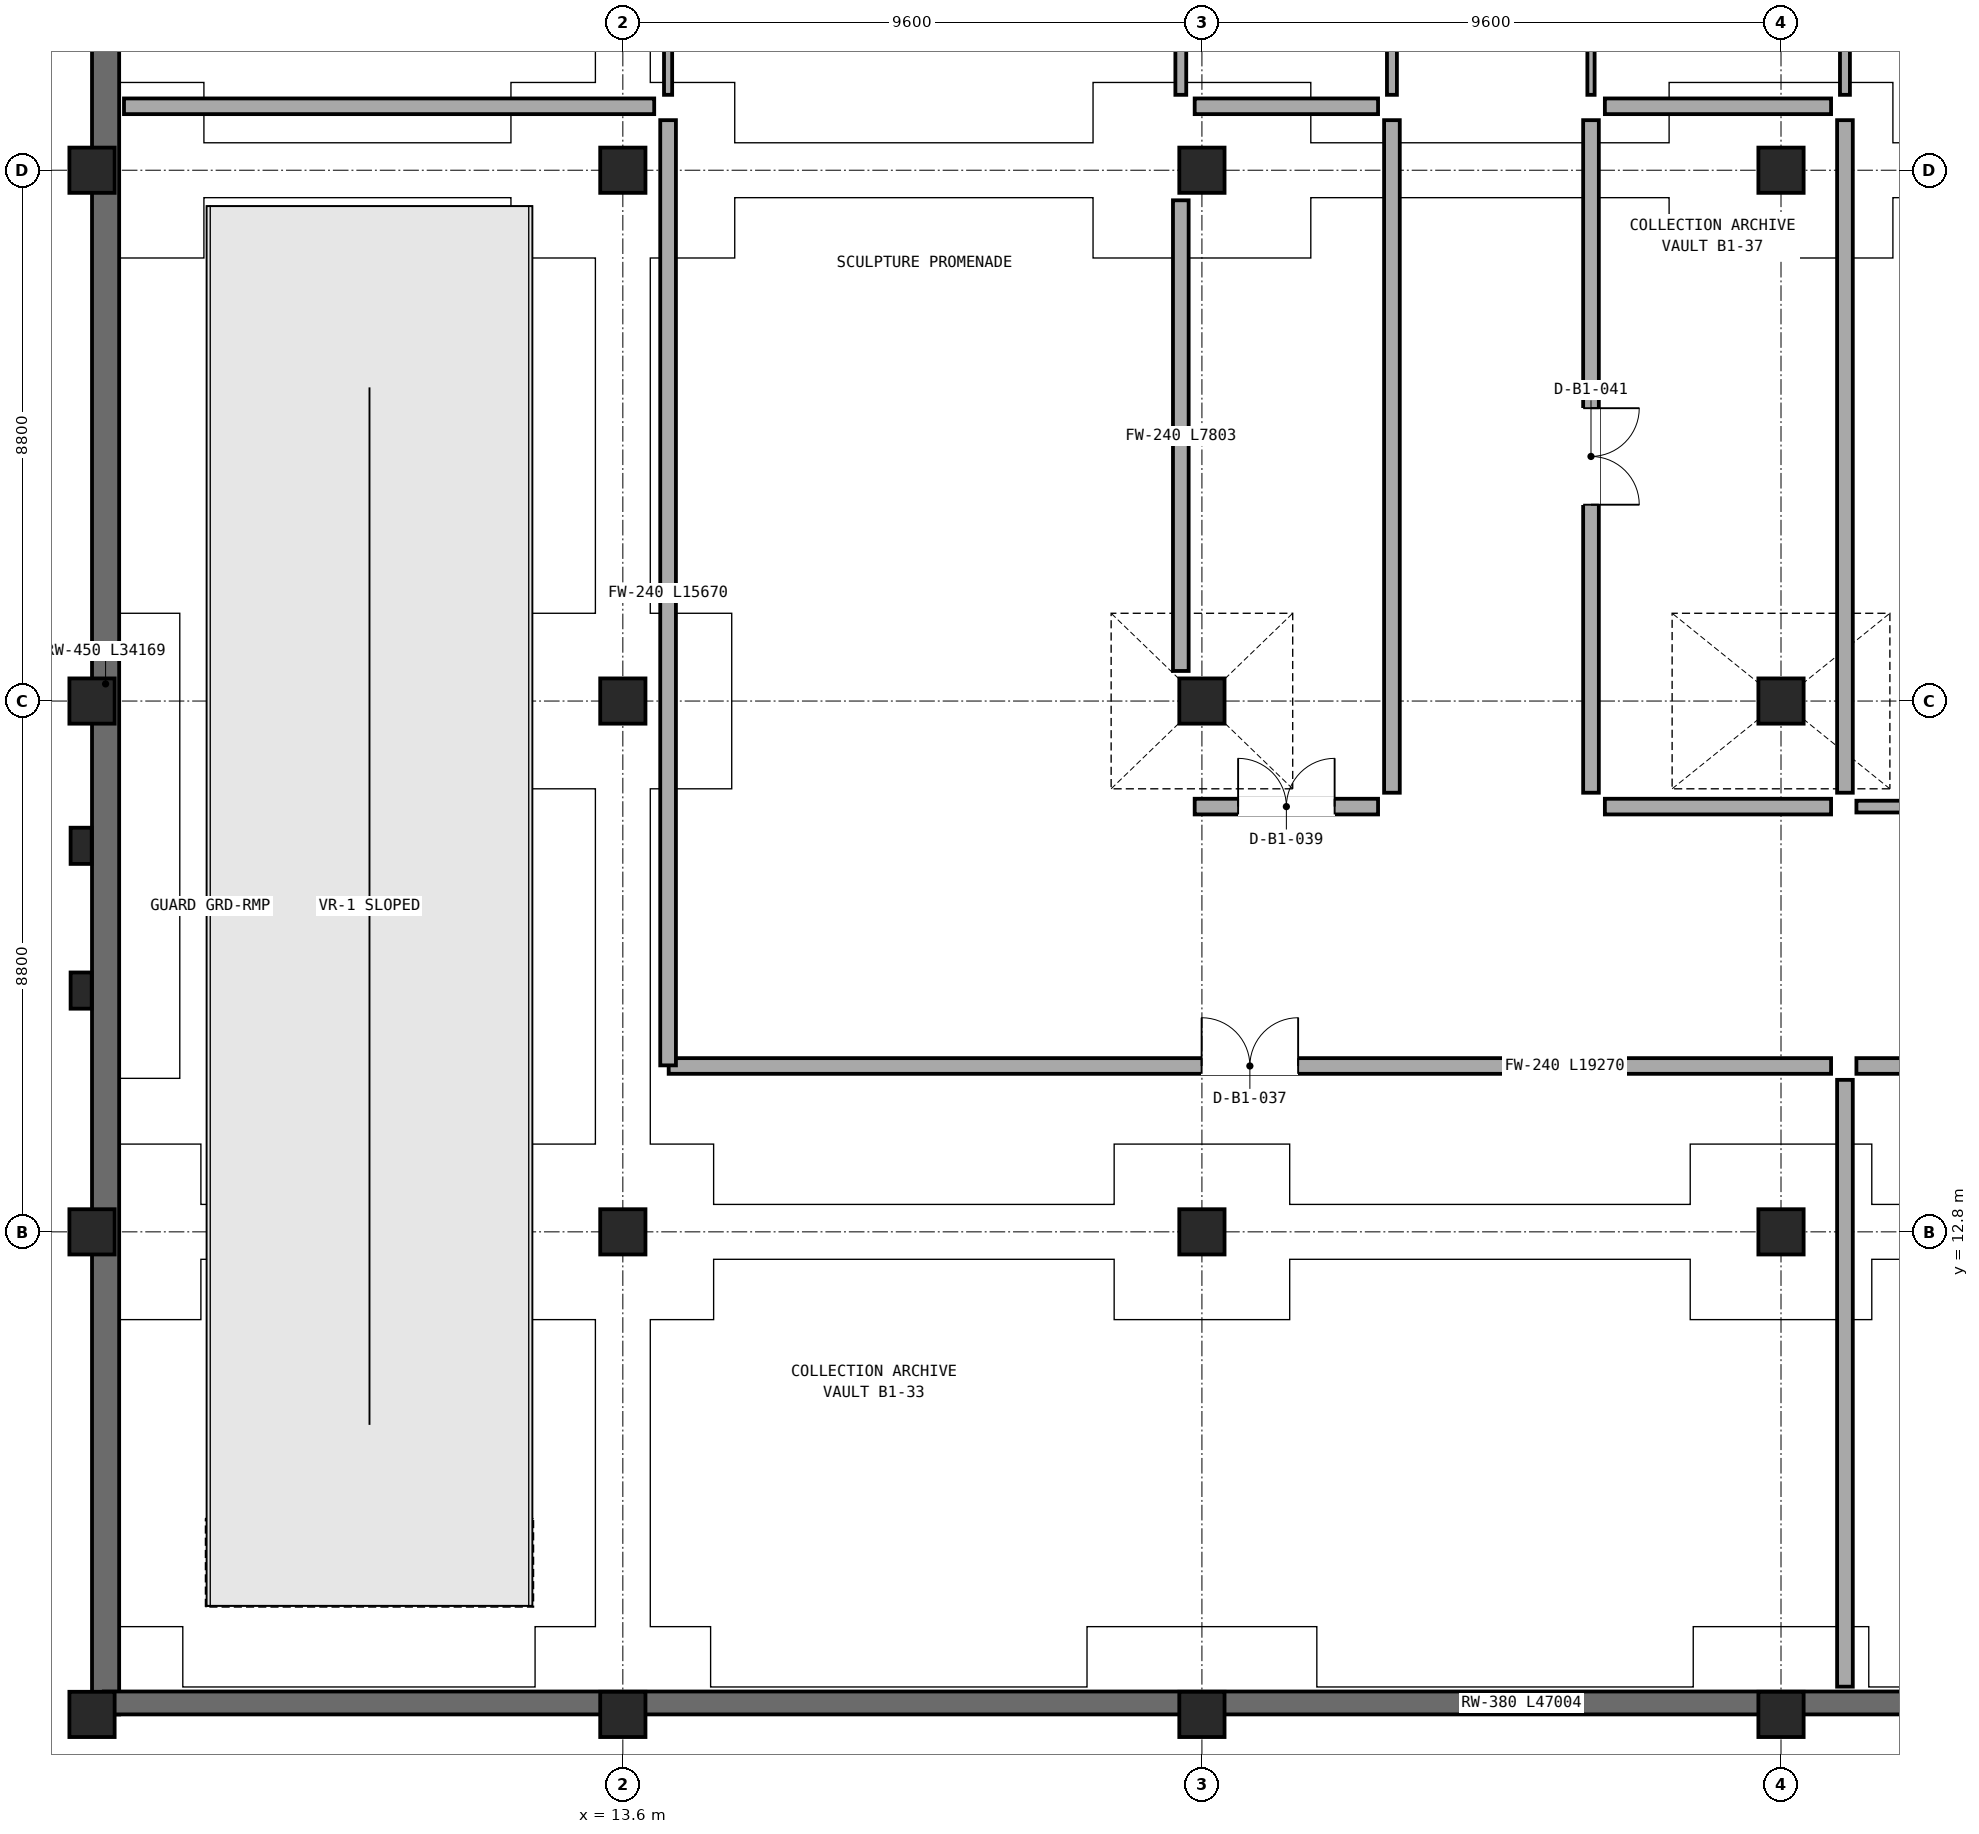
"""IFC4 building model, lengths in metres.
Left out: names, types, materials, properties, quantities, classifications, styles, units other than length and angle.
Written with IfcOpenShell. Run it as: python <this file> out.ifc"""

import sys

from ifc_helpers import new_model, si_unit, direction, frame, frame_2d, origin, origin_2d, place, context, subcontext, project, spatial, rectangle, extrude, element, fill, save


model = new_model("IFC4")
c1 = context("Model", 3, precision=1e-05, world=origin(), true_north=direction((0.0, 1.0)))
c2 = subcontext(c1, "Body", "Model", "MODEL_VIEW")
j1 = project(units=[si_unit("LENGTHUNIT", "METRE"), si_unit("PLANEANGLEUNIT", "RADIAN")], contexts=[c1])
p1 = place(None, origin())
s1 = spatial("IfcSite", under=j1, at=p1, CompositionType="ELEMENT")
p2 = place(p1, origin())
s2 = spatial("IfcBuilding", under=s1, at=p2, CompositionType="ELEMENT")
p3 = place(p2, frame((0.0, 0.0, -5.4)))
s3 = spatial("IfcBuildingStorey", under=s2, at=p3, CompositionType="ELEMENT", Elevation=-5.4)
for number, where, z_axis, x_axis in (
    (1, (4.8, 4.8, 0.0), (0.0, 0.0, 1.0), (1.0, 0.0, 0.0)),
    (2, (4.8, 12.8, 0.0), (0.0, 0.0, 1.0), (1.0, 0.0, 0.0)),
    (3, (4.8, 21.6, 0.0), (0.0, 0.0, 1.0), (1.0, 0.0, 0.0)),
    (4, (4.8, 30.4, 0.0), (0.0, 0.0, 1.0), (1.0, 0.0, 0.0)),
    (5, (13.6, 4.8, 0.0), (0.0, 0.0, 1.0), (1.0, 0.0, 0.0)),
    (6, (13.6, 12.8, 0.0), (0.0, 0.0, 1.0), (1.0, 0.0, 0.0)),
    (7, (13.6, 21.6, 0.0), (0.0, 0.0, 1.0), (1.0, 0.0, 0.0)),
    (8, (13.6, 30.4, 0.0), (0.0, 0.0, 1.0), (1.0, 0.0, 0.0)),
    (9, (23.2, 4.8, 0.0), (0.0, 0.0, 1.0), (1.0, 0.0, 0.0)),
    (10, (23.2, 12.8, 0.0), (0.0, 0.0, 1.0), (1.0, 0.0, 0.0)),
    (11, (23.2, 21.6, 0.0), (0.0, 0.0, 1.0), (1.0, 0.0, 0.0)),
    (12, (23.2, 30.4, 0.0), (0.0, 0.0, 1.0), (1.0, 0.0, 0.0)),
    (13, (32.8, 4.8, 0.0), (0.0, 0.0, 1.0), (1.0, 0.0, 0.0)),
    (14, (32.8, 12.8, 0.0), (0.0, 0.0, 1.0), (1.0, 0.0, 0.0)),
    (15, (32.8, 21.6, 0.0), (0.0, 0.0, 1.0), (1.0, 0.0, 0.0)),
    (16, (32.8, 30.4, 0.0), (0.0, 0.0, 1.0), (1.0, 0.0, 0.0)),
):
    element("IfcColumn", number, at=place(p3, frame(where, z_axis=z_axis, x_axis=x_axis)), inside=s3, PredefinedType="COLUMN", context=c2, shape_type="SweptSolid", body=[
        extrude(rectangle(XDim=0.75, YDim=0.75, at=origin_2d()), origin(), (0.0, 0.0, 1.0), 5.4),
    ])
for number, where, z_axis, x_axis in (
    (17, (4.62, 16.8, 0.0), (0.0, 0.0, 1.0), (0.0, 1.0, 0.0)),
    (18, (4.62, 19.2, 0.0), (0.0, 0.0, 1.0), (0.0, 1.0, 0.0)),
):
    element("IfcColumn", number, at=place(p3, frame(where, z_axis=z_axis, x_axis=x_axis)), inside=s3, PredefinedType="PILASTER", context=c2, shape_type="SweptSolid", body=[
        extrude(rectangle(XDim=0.6, YDim=0.35, at=origin_2d()), origin(), (0.0, 0.0, 1.0), 5.4),
    ])
p4 = place(p3, frame((5.025, 38.969, 0.0), z_axis=(0.0, 0.0, 1.0), x_axis=(0.0, -1.0, 0.0)))
e19 = element("IfcWall", 19, at=p4, inside=s3, PredefinedType="USERDEFINED", context=c2, shape_type="SweptSolid", body=[
    extrude(rectangle(XDim=34.169, YDim=0.45, at=frame_2d((17.084, 0.0))), origin(), (0.0, 0.0, 1.0), 5.06),
])
p5 = place(p3, frame((4.996, 4.99, 0.0), z_axis=(0.0, 0.0, 1.0), x_axis=(1.0, 0.0, 0.0)))
e20 = element("IfcWall", 20, at=p5, inside=s3, PredefinedType="USERDEFINED", context=c2, shape_type="SweptSolid", body=[
    extrude(rectangle(XDim=47.004, YDim=0.38, at=frame_2d((23.502, 0.0))), origin(), (0.0, 0.0, 1.0), 5.06),
])
p6 = place(p3, frame((14.36, 15.55, 0.0), z_axis=(0.0, 0.0, 1.0), x_axis=(1.0, 0.0, 0.0)))
e21 = element("IfcWall", 21, at=p6, inside=s3, PredefinedType="SOLIDWALL", context=c2, shape_type="SweptSolid", body=[
    extrude(rectangle(XDim=19.27, YDim=0.26, at=frame_2d((9.635, 0.0))), origin(), (0.0, 0.0, 1.0), 4.507),
])
p7 = place(p6, frame((8.835, 0.0, 0.0)))
e22 = element("IfcOpeningElement", 22, at=p7, cuts=e21, PredefinedType="OPENING", context=c2, shape_type="SweptSolid", body=[
    extrude(rectangle(XDim=1.6, YDim=2.4, at=frame_2d((0.8, 1.2))), frame((0.0, 0.14, 0.0), z_axis=(0.0, -1.0, 0.0), x_axis=(1.0, 0.0, 0.0)), (0.0, 0.0, 1.0), 0.28),
])
p8 = place(p3, frame((14.35, 31.23, 0.0), z_axis=(0.0, 0.0, 1.0), x_axis=(0.0, -1.0, 0.0)))
e23 = element("IfcWall", 23, at=p8, inside=s3, PredefinedType="SOLIDWALL", context=c2, shape_type="SweptSolid", body=[
    extrude(rectangle(XDim=15.67, YDim=0.26, at=frame_2d((7.835, 0.0))), origin(), (0.0, 0.0, 1.0), 4.428),
])
p9 = place(p3, frame((14.35, 38.84, 0.0), z_axis=(0.0, 0.0, 1.0), x_axis=(0.0, -1.0, 0.0)))
e24 = element("IfcWall", 24, at=p9, inside=s3, PredefinedType="PARTITIONING", context=c2, shape_type="SweptSolid", body=[
    extrude(rectangle(XDim=7.19, YDim=0.135, at=frame_2d((3.595, 0.0))), origin(), (0.0, 0.0, 1.0), 5.03),
])
p10 = place(p9, frame((2.395, 0.0, 0.0)))
e25 = element("IfcOpeningElement", 25, at=p10, cuts=e24, PredefinedType="OPENING", context=c2, shape_type="SweptSolid", body=[
    extrude(rectangle(XDim=2.4, YDim=2.58, at=frame_2d((1.2, 1.29))), frame((0.0, 0.078, 0.0), z_axis=(0.0, -1.0, 0.0), x_axis=(1.0, 0.0, 0.0)), (0.0, 0.0, 1.0), 0.155),
])
p11 = place(p3, frame((26.12, 19.85, 0.0), z_axis=(0.0, 0.0, 1.0), x_axis=(-1.0, 0.0, 0.0)))
e26 = element("IfcWall", 26, at=p11, inside=s3, PredefinedType="SOLIDWALL", context=c2, shape_type="SweptSolid", body=[
    extrude(rectangle(XDim=3.04, YDim=0.26, at=frame_2d((1.52, 0.0))), origin(), (0.0, 0.0, 1.0), 4.507),
])
p12 = place(p11, frame((0.72, 0.0, 0.0)))
e27 = element("IfcOpeningElement", 27, at=p12, cuts=e26, PredefinedType="OPENING", context=c2, shape_type="SweptSolid", body=[
    extrude(rectangle(XDim=1.6, YDim=2.4, at=frame_2d((0.8, 1.2))), frame((0.0, 0.14, 0.0), z_axis=(0.0, -1.0, 0.0), x_axis=(1.0, 0.0, 0.0)), (0.0, 0.0, 1.0), 0.28),
])
p13 = place(p3, frame((22.85, 22.098, 0.0), z_axis=(0.0, 0.0, 1.0), x_axis=(0.0, 1.0, 0.0)))
e28 = element("IfcWall", 28, at=p13, inside=s3, PredefinedType="SOLIDWALL", context=c2, shape_type="SweptSolid", body=[
    extrude(rectangle(XDim=7.803, YDim=0.26, at=frame_2d((3.902, 0.0))), origin(), (0.0, 0.0, 1.0), 5.03),
])
p14 = place(p3, frame((26.35, 31.23, 0.0), z_axis=(0.0, 0.0, 1.0), x_axis=(0.0, -1.0, 0.0)))
e29 = element("IfcWall", 29, at=p14, inside=s3, PredefinedType="SOLIDWALL", context=c2, shape_type="SweptSolid", body=[
    extrude(rectangle(XDim=11.15, YDim=0.26, at=frame_2d((5.575, 0.0))), origin(), (0.0, 0.0, 1.0), 4.428),
])
p15 = place(p3, frame((22.85, 31.65, 0.0), z_axis=(0.0, 0.0, 1.0), x_axis=(0.0, 1.0, 0.0)))
e30 = element("IfcWall", 30, at=p15, inside=s3, PredefinedType="PARTITIONING", context=c2, shape_type="SweptSolid", body=[
    extrude(rectangle(XDim=7.052, YDim=0.18, at=frame_2d((3.526, 0.0))), origin(), (0.0, 0.0, 1.0), 5.03),
])
p16 = place(p15, frame((3.056, 0.0, 0.0)))
e31 = element("IfcOpeningElement", 31, at=p16, cuts=e30, PredefinedType="OPENING", context=c2, shape_type="SweptSolid", body=[
    extrude(rectangle(XDim=0.94, YDim=2.08, at=frame_2d((0.47, 1.04))), frame((0.0, 0.1, 0.0), z_axis=(0.0, -1.0, 0.0), x_axis=(1.0, 0.0, 0.0)), (0.0, 0.0, 1.0), 0.2),
])
p17 = place(p3, frame((26.35, 38.84, 0.0), z_axis=(0.0, 0.0, 1.0), x_axis=(0.0, -1.0, 0.0)))
e32 = element("IfcWall", 32, at=p17, inside=s3, PredefinedType="PARTITIONING", context=c2, shape_type="SweptSolid", body=[
    extrude(rectangle(XDim=7.19, YDim=0.165, at=frame_2d((3.595, 0.0))), origin(), (0.0, 0.0, 1.0), 5.03),
])
p18 = place(p3, frame((29.65, 20.08, 0.0), z_axis=(0.0, 0.0, 1.0), x_axis=(0.0, 1.0, 0.0)))
e33 = element("IfcWall", 33, at=p18, inside=s3, PredefinedType="SOLIDWALL", context=c2, shape_type="SweptSolid", body=[
    extrude(rectangle(XDim=11.15, YDim=0.26, at=frame_2d((5.575, 0.0))), origin(), (0.0, 0.0, 1.0), 4.428),
])
p19 = place(p18, frame((4.775, 0.0, 0.0)))
e34 = element("IfcOpeningElement", 34, at=p19, cuts=e33, PredefinedType="OPENING", context=c2, shape_type="SweptSolid", body=[
    extrude(rectangle(XDim=1.6, YDim=2.4, at=frame_2d((0.8, 1.2))), frame((0.0, 0.14, 0.0), z_axis=(0.0, -1.0, 0.0), x_axis=(1.0, 0.0, 0.0)), (0.0, 0.0, 1.0), 0.28),
])
p20 = place(p3, frame((33.63, 19.85, 0.0), z_axis=(0.0, 0.0, 1.0), x_axis=(-1.0, 0.0, 0.0)))
e35 = element("IfcWall", 35, at=p20, inside=s3, PredefinedType="SOLIDWALL", context=c2, shape_type="SweptSolid", body=[
    extrude(rectangle(XDim=3.75, YDim=0.26, at=frame_2d((1.875, 0.0))), origin(), (0.0, 0.0, 1.0), 4.507),
])
p21 = place(p3, frame((29.65, 31.65, 0.0), z_axis=(0.0, 0.0, 1.0), x_axis=(0.0, 1.0, 0.0)))
e36 = element("IfcWall", 36, at=p21, inside=s3, PredefinedType="PARTITIONING", context=c2, shape_type="SweptSolid", body=[
    extrude(rectangle(XDim=7.19, YDim=0.12, at=frame_2d((3.595, 0.0))), origin(), (0.0, 0.0, 1.0), 5.03),
])
p22 = place(p21, frame((3.075, 0.0, 0.0)))
e37 = element("IfcOpeningElement", 37, at=p22, cuts=e36, PredefinedType="OPENING", context=c2, shape_type="SweptSolid", body=[
    extrude(rectangle(XDim=1.04, YDim=2.08, at=frame_2d((0.52, 1.04))), frame((0.0, 0.07, 0.0), z_axis=(0.0, -1.0, 0.0), x_axis=(1.0, 0.0, 0.0)), (0.0, 0.0, 1.0), 0.14),
])
p23 = place(p3, frame((34.05, 15.55, 0.0), z_axis=(0.0, 0.0, 1.0), x_axis=(1.0, 0.0, 0.0)))
e38 = element("IfcWall", 38, at=p23, inside=s3, PredefinedType="SOLIDWALL", context=c2, shape_type="SweptSolid", body=[
    extrude(rectangle(XDim=17.59, YDim=0.26, at=frame_2d((8.795, 0.0))), origin(), (0.0, 0.0, 1.0), 4.507),
])
p24 = place(p23, frame((7.995, 0.0, 0.0)))
e39 = element("IfcOpeningElement", 39, at=p24, cuts=e38, PredefinedType="OPENING", context=c2, shape_type="SweptSolid", body=[
    extrude(rectangle(XDim=1.6, YDim=2.4, at=frame_2d((0.8, 1.2))), frame((0.0, 0.14, 0.0), z_axis=(0.0, -1.0, 0.0), x_axis=(1.0, 0.0, 0.0)), (0.0, 0.0, 1.0), 0.28),
])
p25 = place(p3, frame((51.64, 19.85, 0.0), z_axis=(0.0, 0.0, 1.0), x_axis=(-1.0, 0.0, 0.0)))
e40 = element("IfcWall", 40, at=p25, inside=s3, PredefinedType="PARTITIONING", context=c2, shape_type="SweptSolid", body=[
    extrude(rectangle(XDim=17.59, YDim=0.195, at=frame_2d((8.795, 0.0))), origin(), (0.0, 0.0, 1.0), 4.507),
])
p26 = place(p25, frame((8.205, 0.0, 0.0)))
e41 = element("IfcOpeningElement", 41, at=p26, cuts=e40, PredefinedType="OPENING", context=c2, shape_type="SweptSolid", body=[
    extrude(rectangle(XDim=1.18, YDim=2.08, at=frame_2d((0.59, 1.04))), frame((0.0, 0.107, 0.0), z_axis=(0.0, -1.0, 0.0), x_axis=(1.0, 0.0, 0.0)), (0.0, 0.0, 1.0), 0.215),
])
p27 = place(p3, frame((5.33, 31.46, 0.0), z_axis=(0.0, 0.0, 1.0), x_axis=(1.0, 0.0, 0.0)))
e42 = element("IfcWall", 42, at=p27, inside=s3, PredefinedType="SOLIDWALL", context=c2, shape_type="SweptSolid", body=[
    extrude(rectangle(XDim=8.79, YDim=0.26, at=frame_2d((4.395, 0.0))), origin(), (0.0, 0.0, 1.0), 4.507),
])
p28 = place(p3, frame((33.86, 15.32, 0.0), z_axis=(0.0, 0.0, 1.0), x_axis=(0.0, -1.0, 0.0)))
e43 = element("IfcWall", 43, at=p28, inside=s3, PredefinedType="SOLIDWALL", context=c2, shape_type="SweptSolid", body=[
    extrude(rectangle(XDim=10.06, YDim=0.26, at=frame_2d((5.03, 0.0))), origin(), (0.0, 0.0, 1.0), 4.428),
])
p29 = place(p3, frame((23.08, 31.46, 0.0), z_axis=(0.0, 0.0, 1.0), x_axis=(1.0, 0.0, 0.0)))
e44 = element("IfcWall", 44, at=p29, inside=s3, PredefinedType="SOLIDWALL", context=c2, shape_type="SweptSolid", body=[
    extrude(rectangle(XDim=3.04, YDim=0.26, at=frame_2d((1.52, 0.0))), origin(), (0.0, 0.0, 1.0), 4.507),
])
p30 = place(p3, frame((29.88, 31.46, 0.0), z_axis=(0.0, 0.0, 1.0), x_axis=(1.0, 0.0, 0.0)))
e45 = element("IfcWall", 45, at=p30, inside=s3, PredefinedType="SOLIDWALL", context=c2, shape_type="SweptSolid", body=[
    extrude(rectangle(XDim=3.75, YDim=0.26, at=frame_2d((1.875, 0.0))), origin(), (0.0, 0.0, 1.0), 4.507),
])
p31 = place(p3, frame((33.86, 31.23, 0.0), z_axis=(0.0, 0.0, 1.0), x_axis=(0.0, -1.0, 0.0)))
e46 = element("IfcWall", 46, at=p31, inside=s3, PredefinedType="SOLIDWALL", context=c2, shape_type="SweptSolid", body=[
    extrude(rectangle(XDim=11.15, YDim=0.26, at=frame_2d((5.575, 0.0))), origin(), (0.0, 0.0, 1.0), 4.428),
])
p32 = place(p3, frame((33.86, 38.84, 0.0), z_axis=(0.0, 0.0, 1.0), x_axis=(0.0, -1.0, 0.0)))
e47 = element("IfcWall", 47, at=p32, inside=s3, PredefinedType="PARTITIONING", context=c2, shape_type="SweptSolid", body=[
    extrude(rectangle(XDim=7.19, YDim=0.165, at=frame_2d((3.595, 0.0))), origin(), (0.0, 0.0, 1.0), 5.03),
])
p33 = place(p7, origin())
e48 = element("IfcDoor", 48, at=p33, inside=s3, OperationType="DOUBLE_DOOR_SINGLE_SWING", PredefinedType="DOOR", context=c2, shape_type="SweptSolid", body=[
    extrude(rectangle(XDim=1.6, YDim=2.4, at=frame_2d((0.8, 1.2))), frame((0.0, 0.025, 0.0), z_axis=(0.0, -1.0, 0.0), x_axis=(1.0, 0.0, 0.0)), (0.0, 0.0, 1.0), 0.05),
])
fill(e22, e48)
p34 = place(p12, frame((1.6, 0.0, 0.0), z_axis=(0.0, 0.0, 1.0), x_axis=(-1.0, 0.0, 0.0)))
e49 = element("IfcDoor", 49, at=p34, inside=s3, OperationType="DOUBLE_DOOR_SINGLE_SWING", PredefinedType="DOOR", context=c2, shape_type="SweptSolid", body=[
    extrude(rectangle(XDim=1.6, YDim=2.4, at=frame_2d((0.8, 1.2))), frame((0.0, 0.025, 0.0), z_axis=(0.0, -1.0, 0.0), x_axis=(1.0, 0.0, 0.0)), (0.0, 0.0, 1.0), 0.05),
])
fill(e27, e49)
p35 = place(p19, frame((1.6, 0.0, 0.0), z_axis=(0.0, 0.0, 1.0), x_axis=(-1.0, 0.0, 0.0)))
e50 = element("IfcDoor", 50, at=p35, inside=s3, OperationType="DOUBLE_DOOR_SINGLE_SWING", PredefinedType="DOOR", context=c2, shape_type="SweptSolid", body=[
    extrude(rectangle(XDim=1.6, YDim=2.4, at=frame_2d((0.8, 1.2))), frame((0.0, 0.025, 0.0), z_axis=(0.0, -1.0, 0.0), x_axis=(1.0, 0.0, 0.0)), (0.0, 0.0, 1.0), 0.05),
])
fill(e34, e50)
save(model, sys.argv[1])
